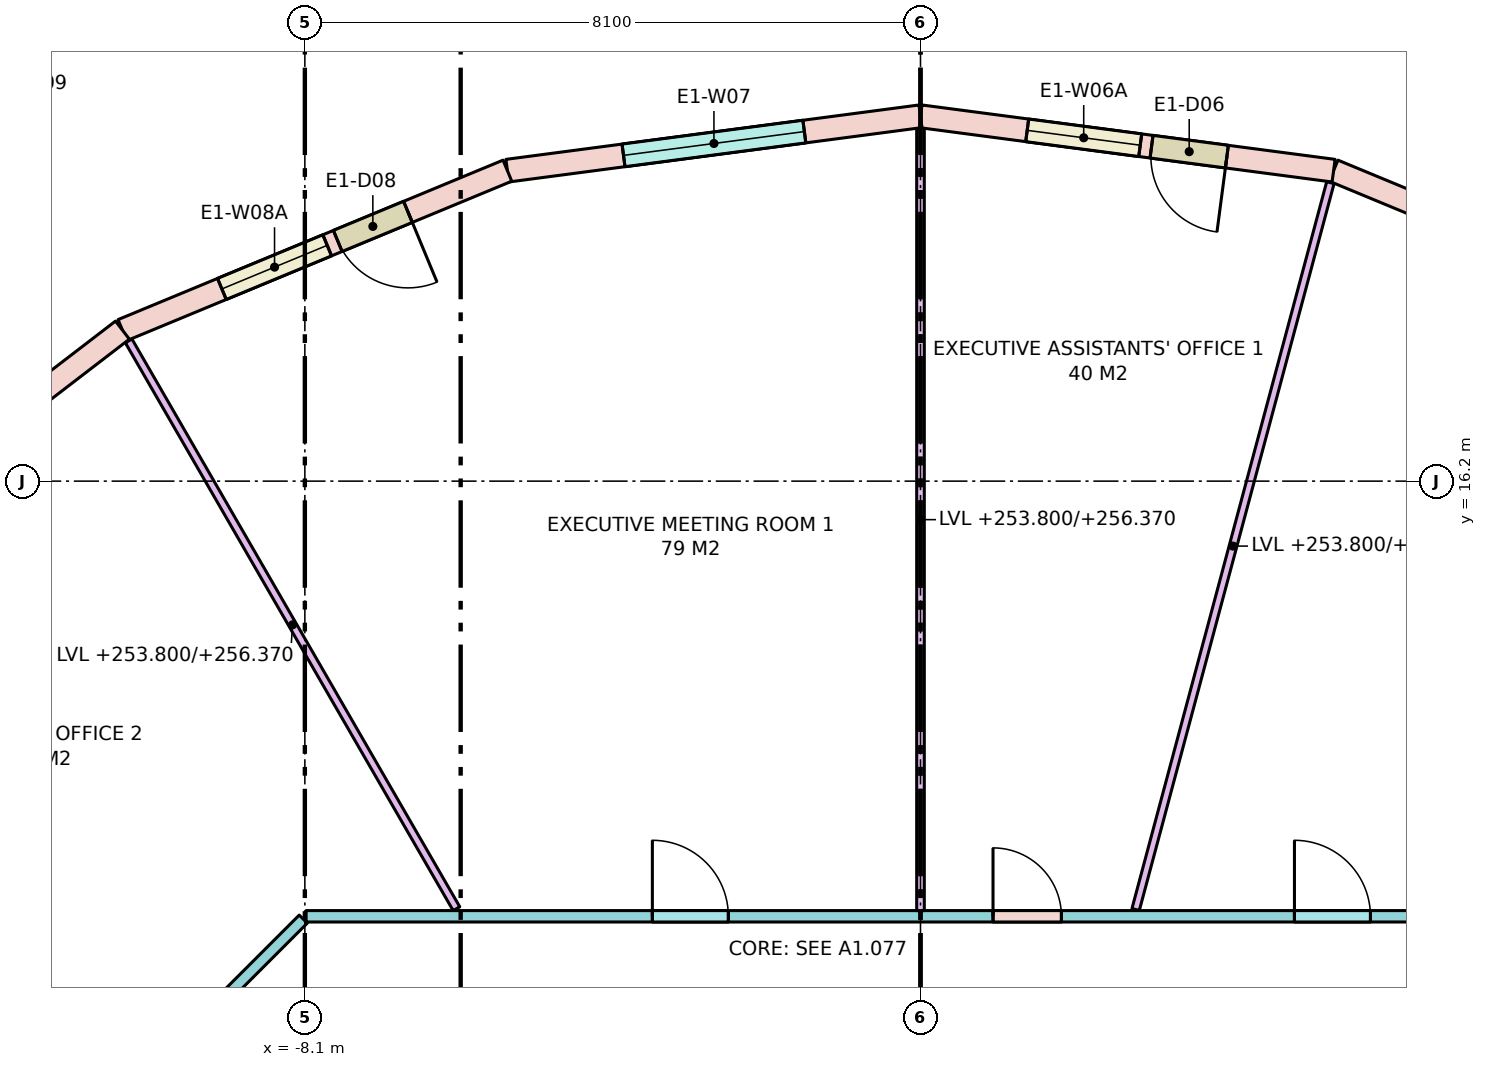
"""IFC4 building model, lengths in metres.
Left out: names, types, materials, properties, quantities, classifications, styles, units other than length and angle.
Written with IfcOpenShell. Run it as: python <this file> out.ifc"""

import sys

from ifc_helpers import new_model, si_unit, direction, frame, frame_2d, origin, place, context, subcontext, project, spatial, rectangle, extrude, element, fill, save


model = new_model("IFC4")
c1 = context("Model", 3, precision=1e-05, world=origin(), true_north=direction((0.0, 1.0)))
c2 = subcontext(c1, "Body", "Model", "MODEL_VIEW")
j1 = project(units=[si_unit("LENGTHUNIT", "METRE"), si_unit("PLANEANGLEUNIT", "RADIAN")], contexts=[c1])
p1 = place(None, origin())
s1 = spatial("IfcSite", under=j1, at=p1, CompositionType="ELEMENT")
p2 = place(p1, origin())
s2 = spatial("IfcBuilding", under=s1, at=p2, CompositionType="ELEMENT")
p3 = place(p2, frame((0.0, 0.0, 253.8)))
s3 = spatial("IfcBuildingStorey", under=s2, at=p3, CompositionType="ELEMENT", Elevation=253.8)
p4 = place(p3, frame((10.5, 18.187, 0.0), z_axis=(0.0, 0.0, 1.0), x_axis=(-0.923877333662, 0.382688740813, 0.0)))
e1 = element("IfcWall", 1, at=p4, inside=s3, PredefinedType="STANDARD", context=c2, shape_type="SweptSolid", body=[
    extrude(rectangle(XDim=5.482, YDim=0.3, at=frame_2d((2.741, 0.0))), origin(), (0.0, 0.0, 1.0), 3.42),
])
p5 = place(p4, frame((1.541, 0.0, 0.8)))
e2 = element("IfcOpeningElement", 2, at=p5, cuts=e1, PredefinedType="OPENING", context=c2, shape_type="SweptSolid", body=[
    extrude(rectangle(XDim=2.4, YDim=2.4, at=frame_2d((1.2, 1.2))), frame((0.0, 0.16, 0.0), z_axis=(0.0, -1.0, 0.0), x_axis=(1.0, 0.0, 0.0)), (0.0, 0.0, 1.0), 0.32),
])
p6 = place(p3, frame((5.435, 20.284, 0.0), z_axis=(0.0, 0.0, 1.0), x_axis=(-0.991444743541, 0.130527087244, 0.0)))
e3 = element("IfcWall", 3, at=p6, inside=s3, PredefinedType="STANDARD", context=c2, shape_type="SweptSolid", body=[
    extrude(rectangle(XDim=5.482, YDim=0.3, at=frame_2d((2.741, 0.0))), origin(), (0.0, 0.0, 1.0), 3.42),
])
p7 = place(p6, frame((1.416, 0.0, 0.0)))
e4 = element("IfcOpeningElement", 4, at=p7, cuts=e3, PredefinedType="OPENING", context=c2, shape_type="SweptSolid", body=[
    extrude(rectangle(XDim=1.0, YDim=2.4, at=frame_2d((0.5, 1.2))), frame((0.0, 0.16, 0.0), z_axis=(0.0, -1.0, 0.0), x_axis=(1.0, 0.0, 0.0)), (0.0, 0.0, 1.0), 0.32),
])
p8 = place(p6, frame((2.566, 0.0, 0.8)))
e5 = element("IfcOpeningElement", 5, at=p8, cuts=e3, PredefinedType="OPENING", context=c2, shape_type="SweptSolid", body=[
    extrude(rectangle(XDim=1.5, YDim=2.4, at=frame_2d((0.75, 1.2))), frame((0.0, 0.16, 0.0), z_axis=(0.0, -1.0, 0.0), x_axis=(1.0, 0.0, 0.0)), (0.0, 0.0, 1.0), 0.32),
])
p9 = place(p3, frame((0.0, 21.0, 0.0), z_axis=(0.0, 0.0, 1.0), x_axis=(-0.991444743541, -0.130527087244, 0.0)))
e6 = element("IfcWall", 6, at=p9, inside=s3, PredefinedType="STANDARD", context=c2, shape_type="SweptSolid", body=[
    extrude(rectangle(XDim=5.482, YDim=0.3, at=frame_2d((2.741, 0.0))), origin(), (0.0, 0.0, 1.0), 3.42),
])
p10 = place(p9, frame((1.541, 0.0, 0.8)))
e7 = element("IfcOpeningElement", 7, at=p10, cuts=e6, PredefinedType="OPENING", context=c2, shape_type="SweptSolid", body=[
    extrude(rectangle(XDim=2.4, YDim=2.4, at=frame_2d((1.2, 1.2))), frame((0.0, 0.16, 0.0), z_axis=(0.0, -1.0, 0.0), x_axis=(1.0, 0.0, 0.0)), (0.0, 0.0, 1.0), 0.32),
])
p11 = place(p3, frame((-5.435, 20.284, 0.0), z_axis=(0.0, 0.0, 1.0), x_axis=(-0.923877333662, -0.382688740813, 0.0)))
e8 = element("IfcWall", 8, at=p11, inside=s3, PredefinedType="STANDARD", context=c2, shape_type="SweptSolid", body=[
    extrude(rectangle(XDim=5.482, YDim=0.3, at=frame_2d((2.741, 0.0))), origin(), (0.0, 0.0, 1.0), 3.42),
])
p12 = place(p11, frame((1.416, 0.0, 0.0)))
e9 = element("IfcOpeningElement", 9, at=p12, cuts=e8, PredefinedType="OPENING", context=c2, shape_type="SweptSolid", body=[
    extrude(rectangle(XDim=1.0, YDim=2.4, at=frame_2d((0.5, 1.2))), frame((0.0, 0.16, 0.0), z_axis=(0.0, -1.0, 0.0), x_axis=(1.0, 0.0, 0.0)), (0.0, 0.0, 1.0), 0.32),
])
p13 = place(p11, frame((2.566, 0.0, 0.8)))
e10 = element("IfcOpeningElement", 10, at=p13, cuts=e8, PredefinedType="OPENING", context=c2, shape_type="SweptSolid", body=[
    extrude(rectangle(XDim=1.5, YDim=2.4, at=frame_2d((0.75, 1.2))), frame((0.0, 0.16, 0.0), z_axis=(0.0, -1.0, 0.0), x_axis=(1.0, 0.0, 0.0)), (0.0, 0.0, 1.0), 0.32),
])
p14 = place(p3, frame((-10.5, 18.187, 0.0), z_axis=(0.0, 0.0, 1.0), x_axis=(-0.793335336593, -0.608784891166, 0.0)))
e11 = element("IfcWall", 11, at=p14, inside=s3, PredefinedType="STANDARD", context=c2, shape_type="SweptSolid", body=[
    extrude(rectangle(XDim=5.482, YDim=0.3, at=frame_2d((2.741, 0.0))), origin(), (0.0, 0.0, 1.0), 3.42),
])
p15 = place(p14, frame((1.541, 0.0, 0.8)))
e12 = element("IfcOpeningElement", 12, at=p15, cuts=e11, PredefinedType="OPENING", context=c2, shape_type="SweptSolid", body=[
    extrude(rectangle(XDim=2.4, YDim=2.4, at=frame_2d((1.2, 1.2))), frame((0.0, 0.16, 0.0), z_axis=(0.0, -1.0, 0.0), x_axis=(1.0, 0.0, 0.0)), (0.0, 0.0, 1.0), 0.32),
])
p16 = place(p3, frame((-12.438, 6.121, 0.0), z_axis=(0.0, 0.0, 1.0), x_axis=(0.707106781187, 0.707106781187, 0.0)))
e13 = element("IfcWall", 13, at=p16, inside=s3, PredefinedType="PARTITIONING", context=c2, shape_type="SweptSolid", body=[
    extrude(rectangle(XDim=6.105, YDim=0.15, at=frame_2d((3.053, 0.0))), origin(), (0.0, 0.0, 1.0), 2.57),
])
p17 = place(p16, frame((3.002, 0.0, 0.0)))
e14 = element("IfcOpeningElement", 14, at=p17, cuts=e13, PredefinedType="OPENING", context=c2, shape_type="SweptSolid", body=[
    extrude(rectangle(XDim=1.0, YDim=2.1, at=frame_2d((0.5, 1.05))), frame((0.0, 0.085, 0.0), z_axis=(0.0, -1.0, 0.0), x_axis=(1.0, 0.0, 0.0)), (0.0, 0.0, 1.0), 0.17),
])
p18 = place(p3, frame((-8.084, 10.475, 0.0), z_axis=(0.0, 0.0, 1.0), x_axis=(1.0, 0.0, 0.0)))
e15 = element("IfcWall", 15, at=p18, inside=s3, PredefinedType="PARTITIONING", context=c2, shape_type="SweptSolid", body=[
    extrude(rectangle(XDim=16.167, YDim=0.15, at=frame_2d((8.084, 0.0))), origin(), (0.0, 0.0, 1.0), 2.57),
])
p19 = place(p18, frame((13.004, 0.0, 0.0)))
e16 = element("IfcOpeningElement", 16, at=p19, cuts=e15, PredefinedType="OPENING", context=c2, shape_type="SweptSolid", body=[
    extrude(rectangle(XDim=1.0, YDim=2.1, at=frame_2d((0.5, 1.05))), frame((0.0, 0.085, 0.0), z_axis=(0.0, -1.0, 0.0), x_axis=(1.0, 0.0, 0.0)), (0.0, 0.0, 1.0), 0.17),
])
p20 = place(p18, frame((9.038, 0.0, 0.0)))
e17 = element("IfcOpeningElement", 17, at=p20, cuts=e15, PredefinedType="OPENING", context=c2, shape_type="SweptSolid", body=[
    extrude(rectangle(XDim=0.9, YDim=2.1, at=frame_2d((0.45, 1.05))), frame((0.0, 0.085, 0.0), z_axis=(0.0, -1.0, 0.0), x_axis=(1.0, 0.0, 0.0)), (0.0, 0.0, 1.0), 0.17),
])
p21 = place(p18, frame((4.556, 0.0, 0.0)))
e18 = element("IfcOpeningElement", 18, at=p21, cuts=e15, PredefinedType="OPENING", context=c2, shape_type="SweptSolid", body=[
    extrude(rectangle(XDim=1.0, YDim=2.1, at=frame_2d((0.5, 1.05))), frame((0.0, 0.085, 0.0), z_axis=(0.0, -1.0, 0.0), x_axis=(1.0, 0.0, 0.0)), (0.0, 0.0, 1.0), 0.17),
])
p22 = place(p3, frame((2.831, 10.564, 0.0), z_axis=(0.0, 0.0, 1.0), x_axis=(0.258795254151, 0.965932200741, 0.0)))
e19 = element("IfcWall", 19, at=p22, inside=s3, PredefinedType="PARTITIONING", context=c2, shape_type="SweptSolid", body=[
    extrude(rectangle(XDim=9.9, YDim=0.1, at=frame_2d((4.95, 0.0))), origin(), (0.0, 0.0, 1.0), 2.57),
])
p23 = place(p3, frame((0.0, 10.55, 0.0), z_axis=(0.0, 0.0, 1.0), x_axis=(0.0, 1.0, 0.0)))
e20 = element("IfcWall", 20, at=p23, inside=s3, PredefinedType="PARTITIONING", context=c2, shape_type="SweptSolid", body=[
    extrude(rectangle(XDim=10.287, YDim=0.1, at=frame_2d((5.143, 0.0))), origin(), (0.0, 0.0, 1.0), 2.57),
])
p24 = place(p3, frame((-6.105, 10.575, 0.0), z_axis=(0.0, 0.0, 1.0), x_axis=(-0.50001399067, 0.866017326117, 0.0)))
e21 = element("IfcWall", 21, at=p24, inside=s3, PredefinedType="PARTITIONING", context=c2, shape_type="SweptSolid", body=[
    extrude(rectangle(XDim=8.626, YDim=0.1, at=frame_2d((4.313, 0.0))), origin(), (0.0, 0.0, 1.0), 2.57),
])
p25 = place(p7, origin())
e22 = element("IfcDoor", 22, at=p25, inside=s3, OperationType="SINGLE_SWING_LEFT", PredefinedType="DOOR", context=c2, shape_type="SweptSolid", body=[
    extrude(rectangle(XDim=1.0, YDim=2.4, at=frame_2d((0.5, 1.2))), frame((0.0, 0.025, 0.0), z_axis=(0.0, -1.0, 0.0), x_axis=(1.0, 0.0, 0.0)), (0.0, 0.0, 1.0), 0.05),
])
fill(e4, e22)
p26 = place(p8, origin())
e23 = element("IfcWindow", 23, at=p26, inside=s3, PartitioningType="SINGLE_PANEL", PredefinedType="WINDOW", context=c2, shape_type="SweptSolid", body=[
    extrude(rectangle(XDim=1.5, YDim=2.4, at=frame_2d((0.75, 1.2))), frame((0.0, 0.03, 0.0), z_axis=(0.0, -1.0, 0.0), x_axis=(1.0, 0.0, 0.0)), (0.0, 0.0, 1.0), 0.06),
])
fill(e5, e23)
p27 = place(p10, origin())
e24 = element("IfcWindow", 24, at=p27, inside=s3, PartitioningType="SINGLE_PANEL", PredefinedType="WINDOW", context=c2, shape_type="SweptSolid", body=[
    extrude(rectangle(XDim=2.4, YDim=2.4, at=frame_2d((1.2, 1.2))), frame((0.0, 0.03, 0.0), z_axis=(0.0, -1.0, 0.0), x_axis=(1.0, 0.0, 0.0)), (0.0, 0.0, 1.0), 0.06),
])
fill(e7, e24)
p28 = place(p12, origin())
e25 = element("IfcDoor", 25, at=p28, inside=s3, OperationType="SINGLE_SWING_LEFT", PredefinedType="DOOR", context=c2, shape_type="SweptSolid", body=[
    extrude(rectangle(XDim=1.0, YDim=2.4, at=frame_2d((0.5, 1.2))), frame((0.0, 0.025, 0.0), z_axis=(0.0, -1.0, 0.0), x_axis=(1.0, 0.0, 0.0)), (0.0, 0.0, 1.0), 0.05),
])
fill(e9, e25)
p29 = place(p13, origin())
e26 = element("IfcWindow", 26, at=p29, inside=s3, PartitioningType="SINGLE_PANEL", PredefinedType="WINDOW", context=c2, shape_type="SweptSolid", body=[
    extrude(rectangle(XDim=1.5, YDim=2.4, at=frame_2d((0.75, 1.2))), frame((0.0, 0.03, 0.0), z_axis=(0.0, -1.0, 0.0), x_axis=(1.0, 0.0, 0.0)), (0.0, 0.0, 1.0), 0.06),
])
fill(e10, e26)
p30 = place(p19, origin())
e27 = element("IfcDoor", 27, at=p30, inside=s3, OperationType="SINGLE_SWING_LEFT", PredefinedType="DOOR", context=c2, shape_type="SweptSolid", body=[
    extrude(rectangle(XDim=1.0, YDim=2.1, at=frame_2d((0.5, 1.05))), frame((0.0, 0.025, 0.0), z_axis=(0.0, -1.0, 0.0), x_axis=(1.0, 0.0, 0.0)), (0.0, 0.0, 1.0), 0.05),
])
fill(e16, e27)
p31 = place(p20, origin())
e28 = element("IfcDoor", 28, at=p31, inside=s3, OperationType="SINGLE_SWING_LEFT", PredefinedType="DOOR", context=c2, shape_type="SweptSolid", body=[
    extrude(rectangle(XDim=0.9, YDim=2.1, at=frame_2d((0.45, 1.05))), frame((0.0, 0.025, 0.0), z_axis=(0.0, -1.0, 0.0), x_axis=(1.0, 0.0, 0.0)), (0.0, 0.0, 1.0), 0.05),
])
fill(e17, e28)
p32 = place(p21, origin())
e29 = element("IfcDoor", 29, at=p32, inside=s3, OperationType="SINGLE_SWING_LEFT", PredefinedType="DOOR", context=c2, shape_type="SweptSolid", body=[
    extrude(rectangle(XDim=1.0, YDim=2.1, at=frame_2d((0.5, 1.05))), frame((0.0, 0.025, 0.0), z_axis=(0.0, -1.0, 0.0), x_axis=(1.0, 0.0, 0.0)), (0.0, 0.0, 1.0), 0.05),
])
fill(e18, e29)
save(model, sys.argv[1])
